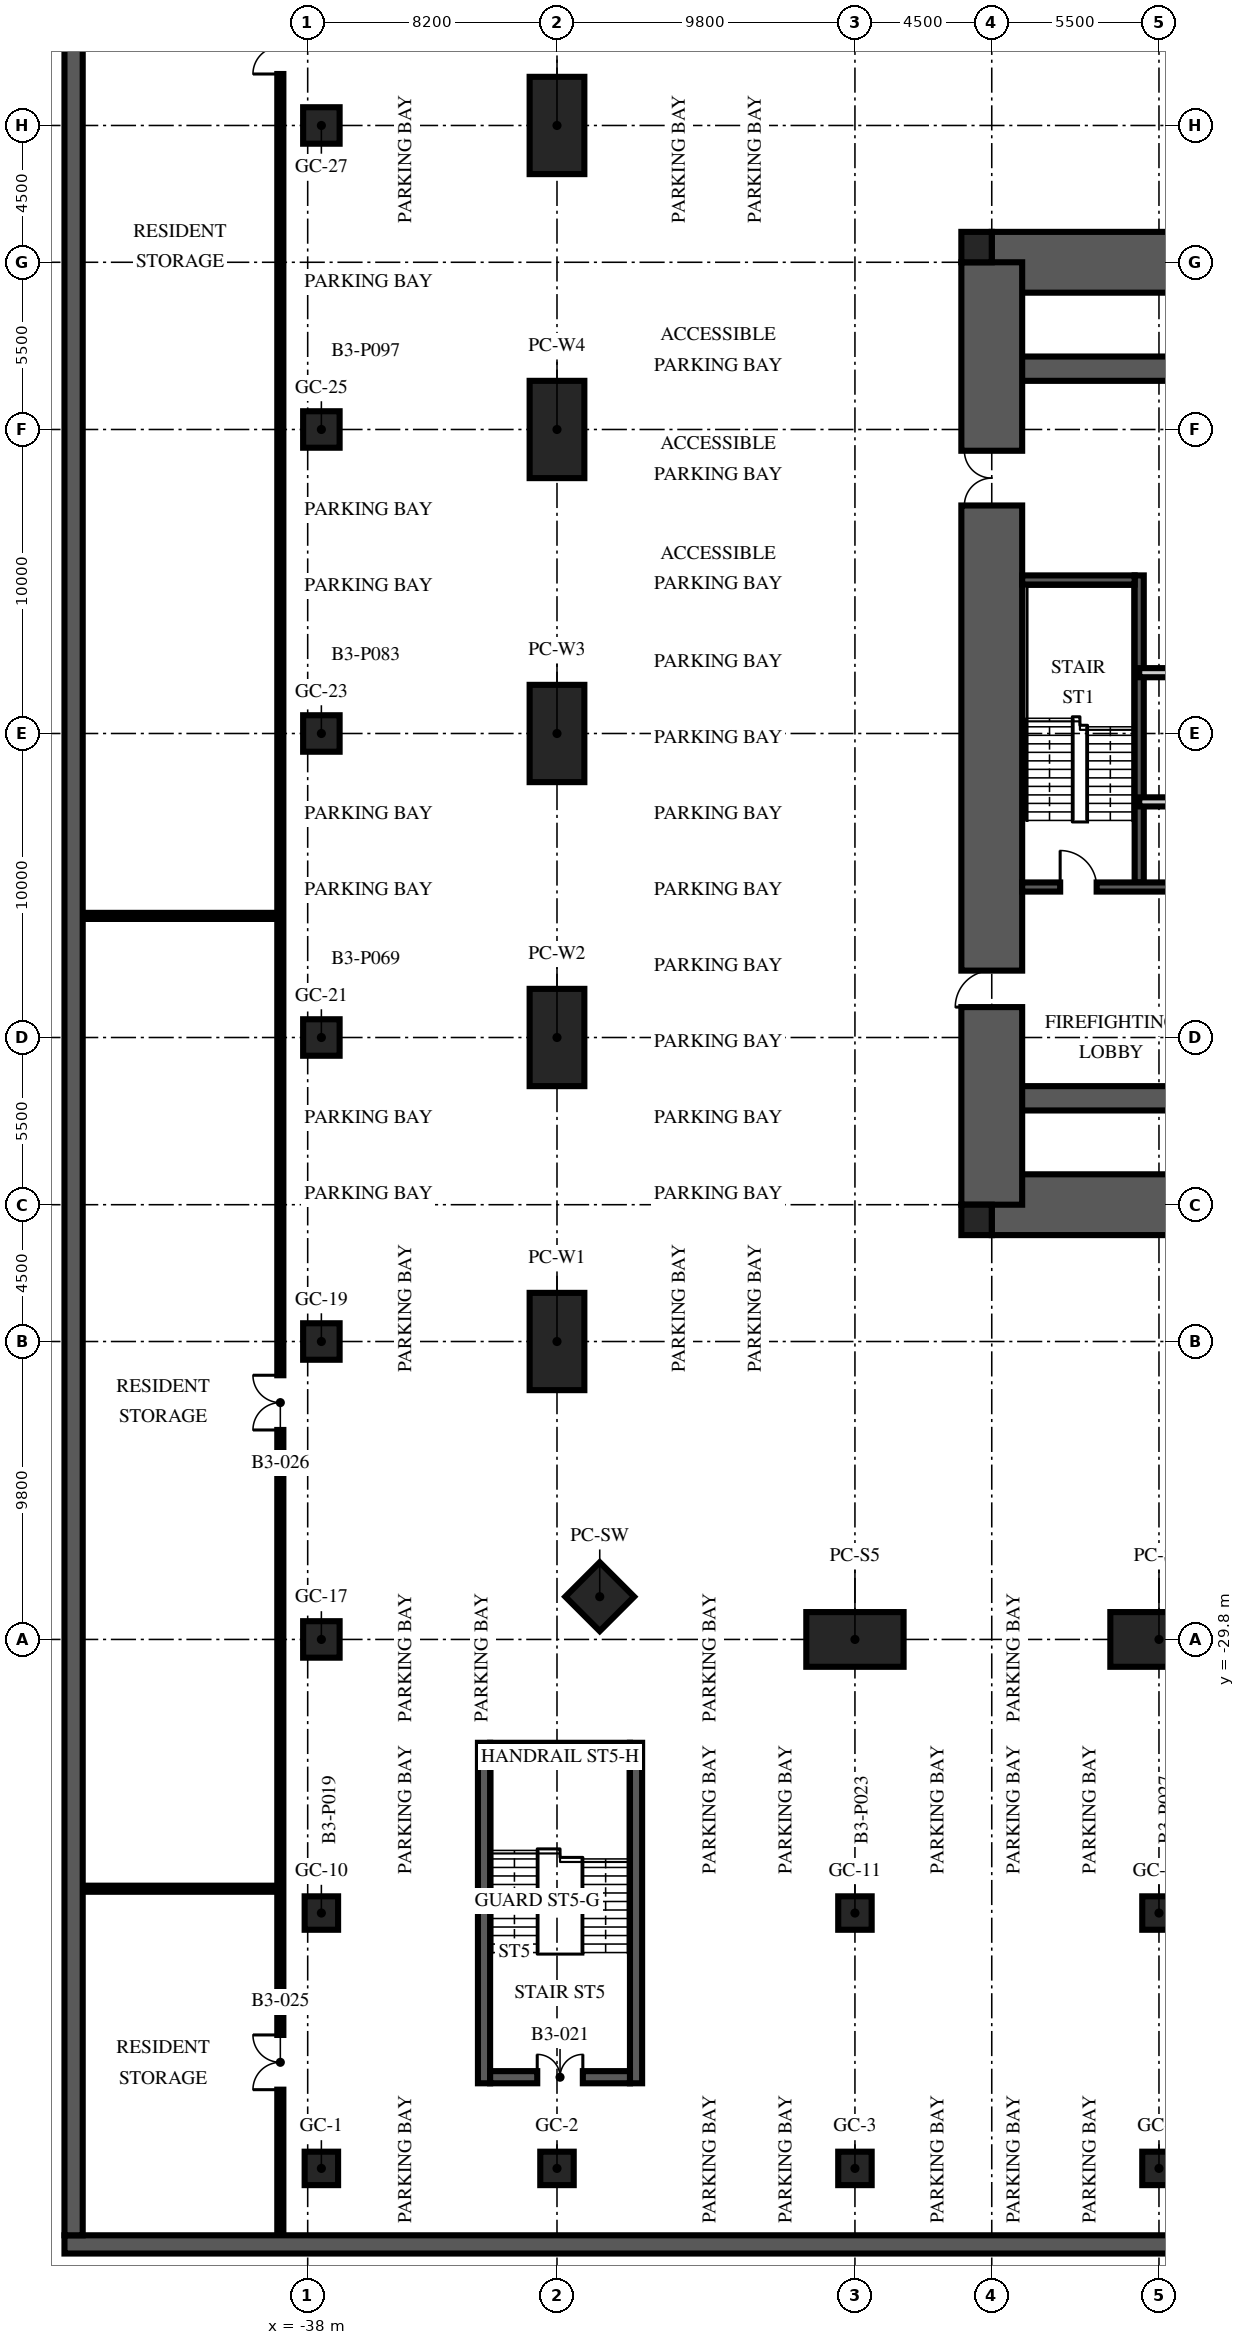
"""IFC4 building model, lengths in metres.
Left out: names, types, materials, properties, quantities, classifications, styles, units other than length and angle.
Written with IfcOpenShell. Run it as: python <this file> out.ifc"""

import sys

from ifc_helpers import new_model, si_unit, direction, frame, frame_2d, origin, origin_2d, place, context, subcontext, project, spatial, rectangle, hollow_rectangle, extrude, element, fill, save


model = new_model("IFC4")
c1 = context("Model", 3, precision=1e-05, world=origin(), true_north=direction((0.0, 1.0)))
c2 = subcontext(c1, "Body", "Model", "MODEL_VIEW")
j1 = project(units=[si_unit("LENGTHUNIT", "METRE"), si_unit("PLANEANGLEUNIT", "RADIAN")], contexts=[c1])
p1 = place(None, origin())
s1 = spatial("IfcSite", under=j1, at=p1, CompositionType="ELEMENT")
p2 = place(p1, origin())
s2 = spatial("IfcBuilding", under=s1, at=p2, CompositionType="ELEMENT")
p3 = place(p2, frame((0.0, 0.0, -13.2)))
s3 = spatial("IfcBuildingStorey", under=s2, at=p3, CompositionType="ELEMENT", Elevation=-13.2)
p4 = place(p3, frame((-15.5, 15.5, -0.4), z_axis=(0.0, 0.0, 1.0), x_axis=(1.0, 0.0, 0.0)))
e1 = element("IfcWall", 1, at=p4, inside=s3, PredefinedType="SHEAR", context=c2, shape_type="SweptSolid", body=[
    extrude(rectangle(XDim=31.0, YDim=2.0, at=frame_2d((15.5, 0.0))), origin(), (0.0, 0.0, 1.0), 4.3),
])
p5 = place(p4, frame((10.4, 0.0, 0.4)))
e2 = element("IfcOpeningElement", 2, at=p5, cuts=e1, PredefinedType="OPENING", context=c2, shape_type="SweptSolid", body=[
    extrude(rectangle(XDim=1.1, YDim=2.1, at=frame_2d((0.55, 1.05))), frame((0.0, 1.01, 0.0), z_axis=(0.0, -1.0, 0.0), x_axis=(1.0, 0.0, 0.0)), (0.0, 0.0, 1.0), 2.02),
])
p6 = place(p4, frame((13.5, 0.0, 0.4)))
e3 = element("IfcOpeningElement", 3, at=p6, cuts=e1, PredefinedType="OPENING", context=c2, shape_type="SweptSolid", body=[
    extrude(rectangle(XDim=1.1, YDim=2.1, at=frame_2d((0.55, 1.05))), frame((0.0, 1.01, 0.0), z_axis=(0.0, -1.0, 0.0), x_axis=(1.0, 0.0, 0.0)), (0.0, 0.0, 1.0), 2.02),
])
p7 = place(p4, frame((16.6, 0.0, 0.4)))
e4 = element("IfcOpeningElement", 4, at=p7, cuts=e1, PredefinedType="OPENING", context=c2, shape_type="SweptSolid", body=[
    extrude(rectangle(XDim=1.1, YDim=2.1, at=frame_2d((0.55, 1.05))), frame((0.0, 1.01, 0.0), z_axis=(0.0, -1.0, 0.0), x_axis=(1.0, 0.0, 0.0)), (0.0, 0.0, 1.0), 2.02),
])
p8 = place(p3, frame((-15.5, -15.5, -0.4), z_axis=(0.0, 0.0, 1.0), x_axis=(1.0, 0.0, 0.0)))
e5 = element("IfcWall", 5, at=p8, inside=s3, PredefinedType="SHEAR", context=c2, shape_type="SweptSolid", body=[
    extrude(rectangle(XDim=31.0, YDim=2.0, at=frame_2d((15.5, 0.0))), origin(), (0.0, 0.0, 1.0), 4.3),
])
for number, where, z_axis, x_axis in (
    (6, (-15.5, 12.0, -0.4), (0.0, 0.0, 1.0), (1.0, 0.0, 0.0)),
    (7, (-15.5, -12.0, -0.4), (0.0, 0.0, 1.0), (1.0, 0.0, 0.0)),
):
    element("IfcWall", number, at=place(p3, frame(where, z_axis=z_axis, x_axis=x_axis)), inside=s3, PredefinedType="SHEAR", context=c2, shape_type="SweptSolid", body=[
        extrude(rectangle(XDim=31.0, YDim=0.8, at=frame_2d((15.5, 0.0))), origin(), (0.0, 0.0, 1.0), 4.3),
    ])
p9 = place(p3, frame((-15.5, -15.5, -0.4), z_axis=(0.0, 0.0, 1.0), x_axis=(0.0, 1.0, 0.0)))
e8 = element("IfcWall", 8, at=p9, inside=s3, PredefinedType="SHEAR", context=c2, shape_type="SweptSolid", body=[
    extrude(rectangle(XDim=31.0, YDim=2.0, at=frame_2d((15.5, 0.0))), origin(), (0.0, 0.0, 1.0), 4.3),
])
p10 = place(p9, frame((6.5, 0.0, 0.4)))
e9 = element("IfcOpeningElement", 9, at=p10, cuts=e8, PredefinedType="OPENING", context=c2, shape_type="SweptSolid", body=[
    extrude(rectangle(XDim=1.2, YDim=2.1, at=frame_2d((0.6, 1.05))), frame((0.0, 1.01, 0.0), z_axis=(0.0, -1.0, 0.0), x_axis=(1.0, 0.0, 0.0)), (0.0, 0.0, 1.0), 2.02),
])
p11 = place(p9, frame((23.0, 0.0, 0.4)))
e10 = element("IfcOpeningElement", 10, at=p11, cuts=e8, PredefinedType="OPENING", context=c2, shape_type="SweptSolid", body=[
    extrude(rectangle(XDim=1.8, YDim=2.1, at=frame_2d((0.9, 1.05))), frame((0.0, 1.01, 0.0), z_axis=(0.0, -1.0, 0.0), x_axis=(1.0, 0.0, 0.0)), (0.0, 0.0, 1.0), 2.02),
])
for number, where, z_axis, x_axis in (
    (11, (-16.0, 16.0, -0.4), (0.0, 0.0, 1.0), (1.0, 0.0, 0.0)),
    (12, (-16.0, -16.0, -0.4), (0.0, 0.0, 1.0), (1.0, 0.0, 0.0)),
):
    element("IfcColumn", number, at=place(p3, frame(where, z_axis=z_axis, x_axis=x_axis)), inside=s3, PredefinedType="COLUMN", context=c2, shape_type="SweptSolid", body=[
        extrude(rectangle(XDim=1.0, YDim=1.0, at=origin_2d()), origin(), (0.0, 0.0, 1.0), 4.3),
    ])
p12 = place(p3, frame((-46.0, -49.7, -0.4), z_axis=(0.0, 0.0, 1.0), x_axis=(1.0, 0.0, 0.0)))
e13 = element("IfcWall", 13, at=p12, inside=s3, PredefinedType="SOLIDWALL", context=c2, shape_type="SweptSolid", body=[
    extrude(rectangle(XDim=92.0, YDim=0.6, at=frame_2d((46.0, 0.0))), origin(), (0.0, 0.0, 1.0), 4.3),
])
p13 = place(p3, frame((-45.7, -49.4, -0.4), z_axis=(0.0, 0.0, 1.0), x_axis=(0.0, 1.0, 0.0)))
e14 = element("IfcWall", 14, at=p13, inside=s3, PredefinedType="SOLIDWALL", context=c2, shape_type="SweptSolid", body=[
    extrude(rectangle(XDim=98.8, YDim=0.6, at=frame_2d((49.4, 0.0))), origin(), (0.0, 0.0, 1.0), 4.3),
])
for number, where, z_axis, x_axis in (
    (15, (-10.0, -29.8, -0.4), (0.0, 0.0, 1.0), (1.0, 0.0, 0.0)),
    (16, (-20.0, -29.8, -0.4), (0.0, 0.0, 1.0), (1.0, 0.0, 0.0)),
    (17, (-29.8, -20.0, -0.4), (0.0, 0.0, 1.0), (0.0, 1.0, 0.0)),
    (18, (-29.8, -10.0, -0.4), (0.0, 0.0, 1.0), (0.0, 1.0, 0.0)),
    (19, (-29.8, 0.0, -0.4), (0.0, 0.0, 1.0), (0.0, 1.0, 0.0)),
    (20, (-29.8, 10.0, -0.4), (0.0, 0.0, 1.0), (0.0, 1.0, 0.0)),
    (21, (-29.8, 20.0, -0.4), (0.0, 0.0, 1.0), (0.0, 1.0, 0.0)),
):
    element("IfcColumn", number, at=place(p3, frame(where, z_axis=z_axis, x_axis=x_axis)), inside=s3, PredefinedType="COLUMN", context=c2, shape_type="SweptSolid", body=[
        extrude(hollow_rectangle(XDim=3.2, YDim=1.8, WallThickness=0.2, at=origin_2d()), origin(), (0.0, 0.0, 1.0), 4.6),
    ])
p14 = place(p3, frame((-28.394, -28.394, -0.4), z_axis=(0.0, 0.0, 1.0), x_axis=(0.707106781187, -0.707106781187, 0.0)))
e22 = element("IfcColumn", 22, at=p14, inside=s3, PredefinedType="COLUMN", context=c2, shape_type="SweptSolid", body=[
    extrude(hollow_rectangle(XDim=1.6, YDim=1.6, WallThickness=0.1, at=origin_2d()), origin(), (0.0, 0.0, 1.0), 4.6),
])
for number, where, z_axis, x_axis in (
    (23, (-37.55, -47.2, -0.4), (0.0, 0.0, 1.0), (1.0, 0.0, 0.0)),
    (24, (-29.8, -47.2, -0.4), (0.0, 0.0, 1.0), (1.0, 0.0, 0.0)),
    (25, (-20.0, -47.2, -0.4), (0.0, 0.0, 1.0), (1.0, 0.0, 0.0)),
    (26, (-10.0, -47.2, -0.4), (0.0, 0.0, 1.0), (1.0, 0.0, 0.0)),
    (27, (-37.55, -38.8, -0.4), (0.0, 0.0, 1.0), (1.0, 0.0, 0.0)),
    (28, (-20.0, -38.8, -0.4), (0.0, 0.0, 1.0), (1.0, 0.0, 0.0)),
    (29, (-10.0, -38.8, -0.4), (0.0, 0.0, 1.0), (1.0, 0.0, 0.0)),
):
    element("IfcColumn", number, at=place(p3, frame(where, z_axis=z_axis, x_axis=x_axis)), inside=s3, PredefinedType="COLUMN", context=c2, shape_type="SweptSolid", body=[
        extrude(rectangle(XDim=1.1, YDim=1.1, at=origin_2d()), origin(), (0.0, 0.0, 1.0), 4.6),
    ])
for number, where, z_axis, x_axis in (
    (30, (-37.55, -29.8, -0.4), (0.0, 0.0, 1.0), (1.0, 0.0, 0.0)),
    (31, (-37.55, -20.0, -0.4), (0.0, 0.0, 1.0), (1.0, 0.0, 0.0)),
    (32, (-37.55, -10.0, -0.4), (0.0, 0.0, 1.0), (1.0, 0.0, 0.0)),
    (33, (-37.55, 0.0, -0.4), (0.0, 0.0, 1.0), (1.0, 0.0, 0.0)),
    (34, (-37.55, 10.0, -0.4), (0.0, 0.0, 1.0), (1.0, 0.0, 0.0)),
    (35, (-37.55, 20.0, -0.4), (0.0, 0.0, 1.0), (1.0, 0.0, 0.0)),
):
    element("IfcColumn", number, at=place(p3, frame(where, z_axis=z_axis, x_axis=x_axis)), inside=s3, PredefinedType="COLUMN", context=c2, shape_type="SweptSolid", body=[
        extrude(rectangle(XDim=1.2, YDim=1.2, at=origin_2d()), origin(), (0.0, 0.0, 1.0), 4.6),
    ])
p15 = place(p3, frame((-10.65, -4.9, 0.0), z_axis=(0.0, 0.0, 1.0), x_axis=(0.0, 1.0, 0.0)))
e36 = element("IfcWall", 36, at=p15, inside=s3, PredefinedType="SOLIDWALL", context=c2, shape_type="SweptSolid", body=[
    extrude(rectangle(XDim=10.1, YDim=0.3, at=frame_2d((5.05, 0.0))), origin(), (0.0, 0.0, 1.0), 3.9),
])
p16 = place(p3, frame((-14.5, -5.05, 0.0), z_axis=(0.0, 0.0, 1.0), x_axis=(1.0, 0.0, 0.0)))
e37 = element("IfcWall", 37, at=p16, inside=s3, PredefinedType="SOLIDWALL", context=c2, shape_type="SweptSolid", body=[
    extrude(rectangle(XDim=5.7, YDim=0.3, at=frame_2d((2.85, 0.0))), origin(), (0.0, 0.0, 1.0), 3.9),
])
p17 = place(p16, frame((1.25, 0.0, 0.0)))
e38 = element("IfcOpeningElement", 38, at=p17, cuts=e37, PredefinedType="OPENING", context=c2, shape_type="SweptSolid", body=[
    extrude(rectangle(XDim=1.2, YDim=2.1, at=frame_2d((0.6, 1.05))), frame((0.0, 0.16, 0.0), z_axis=(0.0, -1.0, 0.0), x_axis=(1.0, 0.0, 0.0)), (0.0, 0.0, 1.0), 0.32),
])
p18 = place(p3, frame((-14.5, 5.05, 0.0), z_axis=(0.0, 0.0, 1.0), x_axis=(1.0, 0.0, 0.0)))
e39 = element("IfcWall", 39, at=p18, inside=s3, PredefinedType="SOLIDWALL", context=c2, shape_type="SweptSolid", body=[
    extrude(rectangle(XDim=3.7, YDim=0.3, at=frame_2d((1.85, 0.0))), origin(), (0.0, 0.0, 1.0), 3.9),
])
p19 = place(p3, frame((-10.65, 2.0, 0.0), z_axis=(0.0, 0.0, 1.0), x_axis=(1.0, 0.0, 0.0)))
e40 = element("IfcWall", 40, at=p19, inside=s3, PredefinedType="PARTITIONING", context=c2, shape_type="SweptSolid", body=[
    extrude(rectangle(XDim=21.3, YDim=0.3, at=frame_2d((10.65, 0.0))), origin(), (0.0, 0.0, 1.0), 3.9),
])
p20 = place(p19, frame((10.05, 0.0, 0.0)))
e41 = element("IfcOpeningElement", 41, at=p20, cuts=e40, PredefinedType="OPENING", context=c2, shape_type="SweptSolid", body=[
    extrude(rectangle(XDim=1.2, YDim=2.1, at=frame_2d((0.6, 1.05))), frame((0.0, 0.16, 0.0), z_axis=(0.0, -1.0, 0.0), x_axis=(1.0, 0.0, 0.0)), (0.0, 0.0, 1.0), 0.32),
])
p21 = place(p19, frame((18.942, 0.0, 0.0)))
e42 = element("IfcOpeningElement", 42, at=p21, cuts=e40, PredefinedType="OPENING", context=c2, shape_type="SweptSolid", body=[
    extrude(rectangle(XDim=0.9, YDim=2.1, at=frame_2d((0.45, 1.05))), frame((0.0, 0.16, 0.0), z_axis=(0.0, -1.0, 0.0), x_axis=(1.0, 0.0, 0.0)), (0.0, 0.0, 1.0), 0.32),
])
p22 = place(p3, frame((-10.65, -2.25, 0.0), z_axis=(0.0, 0.0, 1.0), x_axis=(1.0, 0.0, 0.0)))
e43 = element("IfcWall", 43, at=p22, inside=s3, PredefinedType="PARTITIONING", context=c2, shape_type="SweptSolid", body=[
    extrude(rectangle(XDim=7.35, YDim=0.3, at=frame_2d((3.675, 0.0))), origin(), (0.0, 0.0, 1.0), 3.9),
])
for number, where, z_axis, x_axis in (
    (44, (-32.2, -44.4, 0.0), (0.0, 0.0, 1.0), (0.0, 1.0, 0.0)),
    (45, (-27.2, -44.4, 0.0), (0.0, 0.0, 1.0), (0.0, 1.0, 0.0)),
):
    element("IfcWall", number, at=place(p3, frame(where, z_axis=z_axis, x_axis=x_axis)), inside=s3, PredefinedType="SOLIDWALL", context=c2, shape_type="SweptSolid", body=[
        extrude(rectangle(XDim=11.2, YDim=0.4, at=frame_2d((5.6, 0.0))), origin(), (0.0, 0.0, 1.0), 3.9),
    ])
p23 = place(p3, frame((-32.0, -44.2, 0.0), z_axis=(0.0, 0.0, 1.0), x_axis=(1.0, 0.0, 0.0)))
e46 = element("IfcWall", 46, at=p23, inside=s3, PredefinedType="SOLIDWALL", context=c2, shape_type="SweptSolid", body=[
    extrude(rectangle(XDim=4.6, YDim=0.4, at=frame_2d((2.3, 0.0))), origin(), (0.0, 0.0, 1.0), 3.9),
])
p24 = place(p23, frame((1.55, 0.0, 0.0)))
e47 = element("IfcOpeningElement", 47, at=p24, cuts=e46, PredefinedType="OPENING", context=c2, shape_type="SweptSolid", body=[
    extrude(rectangle(XDim=1.5, YDim=2.1, at=frame_2d((0.75, 1.05))), frame((0.0, 0.21, 0.0), z_axis=(0.0, -1.0, 0.0), x_axis=(1.0, 0.0, 0.0)), (0.0, 0.0, 1.0), 0.42),
])
p25 = place(p3, frame((-32.0, -33.4, 0.0), z_axis=(0.0, 0.0, 1.0), x_axis=(1.0, 0.0, 0.0)))
e48 = element("IfcWall", 48, at=p25, inside=s3, PredefinedType="SOLIDWALL", context=c2, shape_type="SweptSolid", body=[
    extrude(rectangle(XDim=4.6, YDim=0.4, at=frame_2d((2.3, 0.0))), origin(), (0.0, 0.0, 1.0), 3.9),
])
p26 = place(p3, frame((-38.9, -49.38, 0.0), z_axis=(0.0, 0.0, 1.0), x_axis=(0.0, 1.0, 0.0)))
e49 = element("IfcWall", 49, at=p26, inside=s3, PredefinedType="SOLIDWALL", context=c2, shape_type="SweptSolid", body=[
    extrude(rectangle(XDim=98.76, YDim=0.2, at=frame_2d((49.38, 0.0))), origin(), (0.0, 0.0, 1.0), 2.9),
])
p27 = place(p26, frame((4.77, 0.0, 0.0)))
e50 = element("IfcOpeningElement", 50, at=p27, cuts=e49, PredefinedType="OPENING", context=c2, shape_type="SweptSolid", body=[
    extrude(rectangle(XDim=1.8, YDim=2.4, at=frame_2d((0.9, 1.2))), frame((0.0, 0.11, 0.0), z_axis=(0.0, -1.0, 0.0), x_axis=(1.0, 0.0, 0.0)), (0.0, 0.0, 1.0), 0.22),
])
p28 = place(p26, frame((26.47, 0.0, 0.0)))
e51 = element("IfcOpeningElement", 51, at=p28, cuts=e49, PredefinedType="OPENING", context=c2, shape_type="SweptSolid", body=[
    extrude(rectangle(XDim=1.8, YDim=2.4, at=frame_2d((0.9, 1.2))), frame((0.0, 0.11, 0.0), z_axis=(0.0, -1.0, 0.0), x_axis=(1.0, 0.0, 0.0)), (0.0, 0.0, 1.0), 0.22),
])
p29 = place(p26, frame((71.073, 0.0, 0.0)))
e52 = element("IfcOpeningElement", 52, at=p29, cuts=e49, PredefinedType="OPENING", context=c2, shape_type="SweptSolid", body=[
    extrude(rectangle(XDim=1.8, YDim=2.4, at=frame_2d((0.9, 1.2))), frame((0.0, 0.11, 0.0), z_axis=(0.0, -1.0, 0.0), x_axis=(1.0, 0.0, 0.0)), (0.0, 0.0, 1.0), 0.22),
])
p30 = place(p26, frame((93.903, 0.0, 0.0)))
e53 = element("IfcOpeningElement", 53, at=p30, cuts=e49, PredefinedType="OPENING", context=c2, shape_type="SweptSolid", body=[
    extrude(rectangle(XDim=1.8, YDim=2.4, at=frame_2d((0.9, 1.2))), frame((0.0, 0.11, 0.0), z_axis=(0.0, -1.0, 0.0), x_axis=(1.0, 0.0, 0.0)), (0.0, 0.0, 1.0), 0.22),
])
for number, where, z_axis, x_axis in (
    (54, (-45.38, -38.0, 0.0), (0.0, 0.0, 1.0), (1.0, 0.0, 0.0)),
    (55, (-45.38, -6.0, 0.0), (0.0, 0.0, 1.0), (1.0, 0.0, 0.0)),
):
    element("IfcWall", number, at=place(p3, frame(where, z_axis=z_axis, x_axis=x_axis)), inside=s3, PredefinedType="SOLIDWALL", context=c2, shape_type="SweptSolid", body=[
        extrude(rectangle(XDim=6.38, YDim=0.2, at=frame_2d((3.19, 0.0))), origin(), (0.0, 0.0, 1.0), 3.9),
    ])
p31 = place(p17, origin())
e56 = element("IfcDoor", 56, at=p31, inside=s3, OperationType="SINGLE_SWING_LEFT", PredefinedType="DOOR", context=c2, shape_type="SweptSolid", body=[
    extrude(rectangle(XDim=1.2, YDim=2.1, at=frame_2d((0.6, 1.05))), frame((0.0, 0.025, 0.0), z_axis=(0.0, -1.0, 0.0), x_axis=(1.0, 0.0, 0.0)), (0.0, 0.0, 1.0), 0.05),
])
fill(e38, e56)
p32 = place(p10, origin())
e57 = element("IfcDoor", 57, at=p32, inside=s3, OperationType="SINGLE_SWING_LEFT", PredefinedType="DOOR", context=c2, shape_type="SweptSolid", body=[
    extrude(rectangle(XDim=1.2, YDim=2.1, at=frame_2d((0.6, 1.05))), frame((0.0, 0.025, 0.0), z_axis=(0.0, -1.0, 0.0), x_axis=(1.0, 0.0, 0.0)), (0.0, 0.0, 1.0), 0.05),
])
fill(e9, e57)
p33 = place(p11, origin())
e58 = element("IfcDoor", 58, at=p33, inside=s3, OperationType="DOUBLE_DOOR_SINGLE_SWING", PredefinedType="DOOR", context=c2, shape_type="SweptSolid", body=[
    extrude(rectangle(XDim=1.8, YDim=2.1, at=frame_2d((0.9, 1.05))), frame((0.0, 0.025, 0.0), z_axis=(0.0, -1.0, 0.0), x_axis=(1.0, 0.0, 0.0)), (0.0, 0.0, 1.0), 0.05),
])
fill(e10, e58)
p34 = place(p24, origin())
e59 = element("IfcDoor", 59, at=p34, inside=s3, OperationType="DOUBLE_DOOR_SINGLE_SWING", PredefinedType="DOOR", context=c2, shape_type="SweptSolid", body=[
    extrude(rectangle(XDim=1.5, YDim=2.1, at=frame_2d((0.75, 1.05))), frame((0.0, 0.025, 0.0), z_axis=(0.0, -1.0, 0.0), x_axis=(1.0, 0.0, 0.0)), (0.0, 0.0, 1.0), 0.05),
])
fill(e47, e59)
p35 = place(p27, origin())
e60 = element("IfcDoor", 60, at=p35, inside=s3, OperationType="DOUBLE_DOOR_SINGLE_SWING", PredefinedType="DOOR", context=c2, shape_type="SweptSolid", body=[
    extrude(rectangle(XDim=1.8, YDim=2.4, at=frame_2d((0.9, 1.2))), frame((0.0, 0.025, 0.0), z_axis=(0.0, -1.0, 0.0), x_axis=(1.0, 0.0, 0.0)), (0.0, 0.0, 1.0), 0.05),
])
fill(e50, e60)
p36 = place(p28, origin())
e61 = element("IfcDoor", 61, at=p36, inside=s3, OperationType="DOUBLE_DOOR_SINGLE_SWING", PredefinedType="DOOR", context=c2, shape_type="SweptSolid", body=[
    extrude(rectangle(XDim=1.8, YDim=2.4, at=frame_2d((0.9, 1.2))), frame((0.0, 0.025, 0.0), z_axis=(0.0, -1.0, 0.0), x_axis=(1.0, 0.0, 0.0)), (0.0, 0.0, 1.0), 0.05),
])
fill(e51, e61)
p37 = place(p29, origin())
e62 = element("IfcDoor", 62, at=p37, inside=s3, OperationType="DOUBLE_DOOR_SINGLE_SWING", PredefinedType="DOOR", context=c2, shape_type="SweptSolid", body=[
    extrude(rectangle(XDim=1.8, YDim=2.4, at=frame_2d((0.9, 1.2))), frame((0.0, 0.025, 0.0), z_axis=(0.0, -1.0, 0.0), x_axis=(1.0, 0.0, 0.0)), (0.0, 0.0, 1.0), 0.05),
])
fill(e52, e62)
save(model, sys.argv[1])
